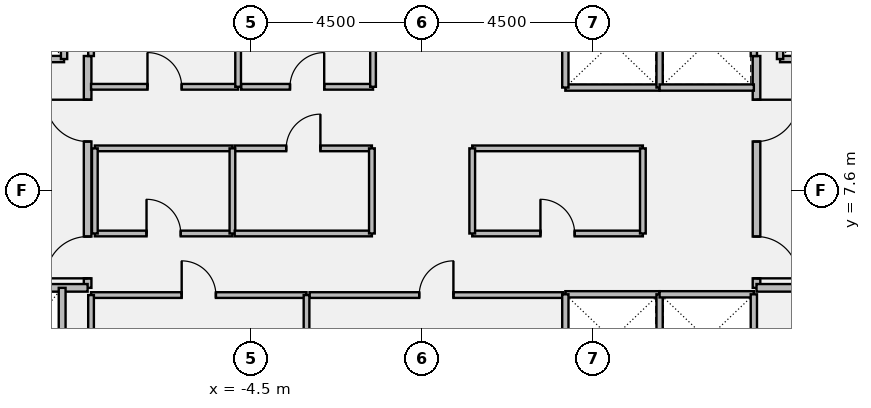
"""IFC4 building model, lengths in metres.
Left out: names, types, materials, properties, quantities, classifications, styles, units other than length and angle.
Written with IfcOpenShell. Run it as: python <this file> out.ifc"""

import sys

from ifc_helpers import new_model, si_unit, direction, frame, frame_2d, origin, place, context, subcontext, project, spatial, rectangle, extrude, element, fill, save


model = new_model("IFC4")
c1 = context("Model", 3, precision=1e-05, world=origin(), true_north=direction((0.0, 1.0)))
c2 = subcontext(c1, "Body", "Model", "MODEL_VIEW")
j1 = project(units=[si_unit("LENGTHUNIT", "METRE"), si_unit("PLANEANGLEUNIT", "RADIAN")], contexts=[c1])
p1 = place(None, origin())
s1 = spatial("IfcSite", under=j1, at=p1, CompositionType="ELEMENT")
p2 = place(p1, origin())
s2 = spatial("IfcBuilding", under=s1, at=p2, CompositionType="ELEMENT")
p3 = place(p2, frame((0.0, 0.0, 297.25)))
s3 = spatial("IfcBuildingStorey", under=s2, at=p3, CompositionType="ELEMENT", Elevation=297.25)
p4 = place(p3, frame((-8.8, 5.05, 0.0), z_axis=(0.0, 0.0, 1.0), x_axis=(0.0, 1.0, 0.0)))
e1 = element("IfcWall", 1, at=p4, inside=s3, PredefinedType="PARTITIONING", context=c2, shape_type="SweptSolid", body=[
    extrude(rectangle(XDim=6.1, YDim=0.2, at=frame_2d((3.05, 0.0))), origin(), (0.0, 0.0, 1.0), 3.56),
])
p5 = place(p4, frame((0.25, 0.0, 0.0)))
e2 = element("IfcOpeningElement", 2, at=p5, cuts=e1, PredefinedType="OPENING", context=c2, shape_type="SweptSolid", body=[
    extrude(rectangle(XDim=1.1, YDim=2.2, at=frame_2d((0.55, 1.1))), frame((0.0, 0.11, 0.0), z_axis=(0.0, -1.0, 0.0), x_axis=(1.0, 0.0, 0.0)), (0.0, 0.0, 1.0), 0.22),
])
p6 = place(p4, frame((3.85, 0.0, 0.0)))
e3 = element("IfcOpeningElement", 3, at=p6, cuts=e1, PredefinedType="OPENING", context=c2, shape_type="SweptSolid", body=[
    extrude(rectangle(XDim=1.1, YDim=2.2, at=frame_2d((0.55, 1.1))), frame((0.0, 0.11, 0.0), z_axis=(0.0, -1.0, 0.0), x_axis=(1.0, 0.0, 0.0)), (0.0, 0.0, 1.0), 0.22),
])
p7 = place(p3, frame((8.8, 11.15, 0.0), z_axis=(0.0, 0.0, 1.0), x_axis=(0.0, -1.0, 0.0)))
e4 = element("IfcWall", 4, at=p7, inside=s3, PredefinedType="PARTITIONING", context=c2, shape_type="SweptSolid", body=[
    extrude(rectangle(XDim=6.1, YDim=0.2, at=frame_2d((3.05, 0.0))), origin(), (0.0, 0.0, 1.0), 3.56),
])
p8 = place(p7, frame((1.15, 0.0, 0.0)))
e5 = element("IfcOpeningElement", 5, at=p8, cuts=e4, PredefinedType="OPENING", context=c2, shape_type="SweptSolid", body=[
    extrude(rectangle(XDim=1.1, YDim=2.2, at=frame_2d((0.55, 1.1))), frame((0.0, 0.11, 0.0), z_axis=(0.0, -1.0, 0.0), x_axis=(1.0, 0.0, 0.0)), (0.0, 0.0, 1.0), 0.22),
])
p9 = place(p7, frame((4.75, 0.0, 0.0)))
e6 = element("IfcOpeningElement", 6, at=p9, cuts=e4, PredefinedType="OPENING", context=c2, shape_type="SweptSolid", body=[
    extrude(rectangle(XDim=1.1, YDim=2.2, at=frame_2d((0.55, 1.1))), frame((0.0, 0.11, 0.0), z_axis=(0.0, -1.0, 0.0), x_axis=(1.0, 0.0, 0.0)), (0.0, 0.0, 1.0), 0.22),
])
p10 = place(p3, frame((-8.71, 4.86, 0.0), z_axis=(0.0, 0.0, 1.0), x_axis=(1.0, 0.0, 0.0)))
e7 = element("IfcWall", 7, at=p10, inside=s3, PredefinedType="PARTITIONING", context=c2, shape_type="SweptSolid", body=[
    extrude(rectangle(XDim=5.67, YDim=0.15, at=frame_2d((2.835, 0.0))), origin(), (0.0, 0.0, 1.0), 3.56),
])
p11 = place(p10, frame((2.385, 0.0, 0.0)))
e8 = element("IfcOpeningElement", 8, at=p11, cuts=e7, PredefinedType="OPENING", context=c2, shape_type="SweptSolid", body=[
    extrude(rectangle(XDim=0.9, YDim=2.15, at=frame_2d((0.45, 1.075))), frame((0.0, 0.085, 0.0), z_axis=(0.0, -1.0, 0.0), x_axis=(1.0, 0.0, 0.0)), (0.0, 0.0, 1.0), 0.17),
])
p12 = place(p3, frame((-2.96, 4.86, 0.0), z_axis=(0.0, 0.0, 1.0), x_axis=(1.0, 0.0, 0.0)))
e9 = element("IfcWall", 9, at=p12, inside=s3, PredefinedType="PARTITIONING", context=c2, shape_type="SweptSolid", body=[
    extrude(rectangle(XDim=6.67, YDim=0.15, at=frame_2d((3.335, 0.0))), origin(), (0.0, 0.0, 1.0), 3.56),
])
p13 = place(p12, frame((2.885, 0.0, 0.0)))
e10 = element("IfcOpeningElement", 10, at=p13, cuts=e9, PredefinedType="OPENING", context=c2, shape_type="SweptSolid", body=[
    extrude(rectangle(XDim=0.9, YDim=2.15, at=frame_2d((0.45, 1.075))), frame((0.0, 0.085, 0.0), z_axis=(0.0, -1.0, 0.0), x_axis=(1.0, 0.0, 0.0)), (0.0, 0.0, 1.0), 0.17),
])
p14 = place(p3, frame((-8.71, 10.34, 0.0), z_axis=(0.0, 0.0, 1.0), x_axis=(1.0, 0.0, 0.0)))
e11 = element("IfcWall", 11, at=p14, inside=s3, PredefinedType="PARTITIONING", context=c2, shape_type="SweptSolid", body=[
    extrude(rectangle(XDim=3.87, YDim=0.15, at=frame_2d((1.935, 0.0))), origin(), (0.0, 0.0, 1.0), 3.56),
])
p15 = place(p14, frame((1.485, 0.0, 0.0)))
e12 = element("IfcOpeningElement", 12, at=p15, cuts=e11, PredefinedType="OPENING", context=c2, shape_type="SweptSolid", body=[
    extrude(rectangle(XDim=0.9, YDim=2.15, at=frame_2d((0.45, 1.075))), frame((0.0, 0.085, 0.0), z_axis=(0.0, -1.0, 0.0), x_axis=(1.0, 0.0, 0.0)), (0.0, 0.0, 1.0), 0.17),
])
p16 = place(p3, frame((-4.76, 10.34, 0.0), z_axis=(0.0, 0.0, 1.0), x_axis=(1.0, 0.0, 0.0)))
e13 = element("IfcWall", 13, at=p16, inside=s3, PredefinedType="PARTITIONING", context=c2, shape_type="SweptSolid", body=[
    extrude(rectangle(XDim=3.47, YDim=0.15, at=frame_2d((1.735, 0.0))), origin(), (0.0, 0.0, 1.0), 3.56),
])
p17 = place(p16, frame((1.285, 0.0, 0.0)))
e14 = element("IfcOpeningElement", 14, at=p17, cuts=e13, PredefinedType="OPENING", context=c2, shape_type="SweptSolid", body=[
    extrude(rectangle(XDim=0.9, YDim=2.15, at=frame_2d((0.45, 1.075))), frame((0.0, 0.085, 0.0), z_axis=(0.0, -1.0, 0.0), x_axis=(1.0, 0.0, 0.0)), (0.0, 0.0, 1.0), 0.17),
])
p18 = place(p3, frame((-8.61, 6.48, 0.0), z_axis=(0.0, 0.0, 1.0), x_axis=(1.0, 0.0, 0.0)))
e15 = element("IfcWall", 15, at=p18, inside=s3, PredefinedType="PARTITIONING", context=c2, shape_type="SweptSolid", body=[
    extrude(rectangle(XDim=3.62, YDim=0.15, at=frame_2d((1.81, 0.0))), origin(), (0.0, 0.0, 1.0), 3.56),
])
p19 = place(p18, frame((1.36, 0.0, 0.0)))
e16 = element("IfcOpeningElement", 16, at=p19, cuts=e15, PredefinedType="OPENING", context=c2, shape_type="SweptSolid", body=[
    extrude(rectangle(XDim=0.9, YDim=2.15, at=frame_2d((0.45, 1.075))), frame((0.0, 0.085, 0.0), z_axis=(0.0, -1.0, 0.0), x_axis=(1.0, 0.0, 0.0)), (0.0, 0.0, 1.0), 0.17),
])
p20 = place(p3, frame((-4.93, 8.72, 0.0), z_axis=(0.0, 0.0, 1.0), x_axis=(1.0, 0.0, 0.0)))
e17 = element("IfcWall", 17, at=p20, inside=s3, PredefinedType="PARTITIONING", context=c2, shape_type="SweptSolid", body=[
    extrude(rectangle(XDim=3.61, YDim=0.15, at=frame_2d((1.805, 0.0))), origin(), (0.0, 0.0, 1.0), 3.56),
])
p21 = place(p20, frame((1.355, 0.0, 0.0)))
e18 = element("IfcOpeningElement", 18, at=p21, cuts=e17, PredefinedType="OPENING", context=c2, shape_type="SweptSolid", body=[
    extrude(rectangle(XDim=0.9, YDim=2.15, at=frame_2d((0.45, 1.075))), frame((0.0, 0.085, 0.0), z_axis=(0.0, -1.0, 0.0), x_axis=(1.0, 0.0, 0.0)), (0.0, 0.0, 1.0), 0.17),
])
p22 = place(p3, frame((1.32, 6.48, 0.0), z_axis=(0.0, 0.0, 1.0), x_axis=(1.0, 0.0, 0.0)))
e19 = element("IfcWall", 19, at=p22, inside=s3, PredefinedType="PARTITIONING", context=c2, shape_type="SweptSolid", body=[
    extrude(rectangle(XDim=4.49, YDim=0.15, at=frame_2d((2.245, 0.0))), origin(), (0.0, 0.0, 1.0), 3.56),
])
p23 = place(p22, frame((1.795, 0.0, 0.0)))
e20 = element("IfcOpeningElement", 20, at=p23, cuts=e19, PredefinedType="OPENING", context=c2, shape_type="SweptSolid", body=[
    extrude(rectangle(XDim=0.9, YDim=2.15, at=frame_2d((0.45, 1.075))), frame((0.0, 0.085, 0.0), z_axis=(0.0, -1.0, 0.0), x_axis=(1.0, 0.0, 0.0)), (0.0, 0.0, 1.0), 0.17),
])
for number, where, z_axis, x_axis in (
    (21, (-11.65, 5.05, 0.0), (0.0, 0.0, 1.0), (1.0, 0.0, 0.0)),
    (22, (8.8, 5.05, 0.0), (0.0, 0.0, 1.0), (1.0, 0.0, 0.0)),
):
    element("IfcWall", number, at=place(p3, frame(where, z_axis=z_axis, x_axis=x_axis)), inside=s3, PredefinedType="PARTITIONING", context=c2, shape_type="SweptSolid", body=[
        extrude(rectangle(XDim=2.85, YDim=0.2, at=frame_2d((1.425, 0.0))), origin(), (0.0, 0.0, 1.0), 3.56),
    ])
p24 = place(p3, frame((-11.58, 11.07, 0.0), z_axis=(0.0, 0.0, 1.0), x_axis=(1.0, 0.0, 0.0)))
e23 = element("IfcWall", 23, at=p24, inside=s3, PredefinedType="PARTITIONING", context=c2, shape_type="SweptSolid", body=[
    extrude(rectangle(XDim=2.16, YDim=0.165, at=frame_2d((1.08, 0.0))), origin(), (0.0, 0.0, 1.0), 3.56),
])
p25 = place(p3, frame((-9.42, 11.07, 0.0), z_axis=(0.0, 0.0, 1.0), x_axis=(0.0, 1.0, 0.0)))
e24 = element("IfcWall", 24, at=p25, inside=s3, PredefinedType="PARTITIONING", context=c2, shape_type="SweptSolid", body=[
    extrude(rectangle(XDim=2.96, YDim=0.165, at=frame_2d((1.48, 0.0))), origin(), (0.0, 0.0, 1.0), 3.56),
])
p26 = place(p3, frame((9.42, 11.07, 0.0), z_axis=(0.0, 0.0, 1.0), x_axis=(1.0, 0.0, 0.0)))
e25 = element("IfcWall", 25, at=p26, inside=s3, PredefinedType="PARTITIONING", context=c2, shape_type="SweptSolid", body=[
    extrude(rectangle(XDim=2.16, YDim=0.165, at=frame_2d((1.08, 0.0))), origin(), (0.0, 0.0, 1.0), 3.56),
])
p27 = place(p3, frame((9.42, 11.07, 0.0), z_axis=(0.0, 0.0, 1.0), x_axis=(0.0, 1.0, 0.0)))
e26 = element("IfcWall", 26, at=p27, inside=s3, PredefinedType="PARTITIONING", context=c2, shape_type="SweptSolid", body=[
    extrude(rectangle(XDim=2.96, YDim=0.165, at=frame_2d((1.48, 0.0))), origin(), (0.0, 0.0, 1.0), 3.56),
])
p28 = place(p3, frame((3.77, 4.88, 0.0), z_axis=(0.0, 0.0, 1.0), x_axis=(1.0, 0.0, 0.0)))
e27 = element("IfcWall", 27, at=p28, inside=s3, PredefinedType="PARTITIONING", context=c2, shape_type="SweptSolid", body=[
    extrude(rectangle(XDim=2.48, YDim=0.165, at=frame_2d((1.24, 0.0))), origin(), (0.0, 0.0, 1.0), 3.56),
])
for number, where, z_axis, x_axis in (
    (28, (3.77, 2.52, 0.0), (0.0, 0.0, 1.0), (0.0, 1.0, 0.0)),
    (29, (6.25, 2.52, 0.0), (0.0, 0.0, 1.0), (0.0, 1.0, 0.0)),
):
    element("IfcWall", number, at=place(p3, frame(where, z_axis=z_axis, x_axis=x_axis)), inside=s3, PredefinedType="PARTITIONING", context=c2, shape_type="SweptSolid", body=[
        extrude(rectangle(XDim=2.36, YDim=0.165, at=frame_2d((1.18, 0.0))), origin(), (0.0, 0.0, 1.0), 3.56),
    ])
p29 = place(p3, frame((6.25, 4.88, 0.0), z_axis=(0.0, 0.0, 1.0), x_axis=(1.0, 0.0, 0.0)))
e30 = element("IfcWall", 30, at=p29, inside=s3, PredefinedType="PARTITIONING", context=c2, shape_type="SweptSolid", body=[
    extrude(rectangle(XDim=2.48, YDim=0.165, at=frame_2d((1.24, 0.0))), origin(), (0.0, 0.0, 1.0), 3.56),
])
p30 = place(p3, frame((8.73, 2.52, 0.0), z_axis=(0.0, 0.0, 1.0), x_axis=(0.0, 1.0, 0.0)))
e31 = element("IfcWall", 31, at=p30, inside=s3, PredefinedType="PARTITIONING", context=c2, shape_type="SweptSolid", body=[
    extrude(rectangle(XDim=2.36, YDim=0.165, at=frame_2d((1.18, 0.0))), origin(), (0.0, 0.0, 1.0), 3.56),
])
p31 = place(p3, frame((3.77, 10.32, 0.0), z_axis=(0.0, 0.0, 1.0), x_axis=(1.0, 0.0, 0.0)))
e32 = element("IfcWall", 32, at=p31, inside=s3, PredefinedType="PARTITIONING", context=c2, shape_type="SweptSolid", body=[
    extrude(rectangle(XDim=2.48, YDim=0.165, at=frame_2d((1.24, 0.0))), origin(), (0.0, 0.0, 1.0), 3.56),
])
for number, where, z_axis, x_axis in (
    (33, (3.77, 10.32, 0.0), (0.0, 0.0, 1.0), (0.0, 1.0, 0.0)),
    (34, (6.25, 10.32, 0.0), (0.0, 0.0, 1.0), (0.0, 1.0, 0.0)),
):
    element("IfcWall", number, at=place(p3, frame(where, z_axis=z_axis, x_axis=x_axis)), inside=s3, PredefinedType="PARTITIONING", context=c2, shape_type="SweptSolid", body=[
        extrude(rectangle(XDim=2.36, YDim=0.165, at=frame_2d((1.18, 0.0))), origin(), (0.0, 0.0, 1.0), 3.56),
    ])
p32 = place(p3, frame((6.25, 10.32, 0.0), z_axis=(0.0, 0.0, 1.0), x_axis=(1.0, 0.0, 0.0)))
e35 = element("IfcWall", 35, at=p32, inside=s3, PredefinedType="PARTITIONING", context=c2, shape_type="SweptSolid", body=[
    extrude(rectangle(XDim=2.48, YDim=0.165, at=frame_2d((1.24, 0.0))), origin(), (0.0, 0.0, 1.0), 3.56),
])
p33 = place(p3, frame((8.73, 11.15, 0.0), z_axis=(0.0, 0.0, 1.0), x_axis=(0.0, 1.0, 0.0)))
e36 = element("IfcWall", 36, at=p33, inside=s3, PredefinedType="PARTITIONING", context=c2, shape_type="SweptSolid", body=[
    extrude(rectangle(XDim=1.53, YDim=0.165, at=frame_2d((0.765, 0.0))), origin(), (0.0, 0.0, 1.0), 3.56),
])
for number, where, z_axis, x_axis in (
    (37, (-8.71, 2.49, 0.0), (0.0, 0.0, 1.0), (0.0, 1.0, 0.0)),
    (38, (-3.04, 2.49, 0.0), (0.0, 0.0, 1.0), (0.0, 1.0, 0.0)),
):
    element("IfcWall", number, at=place(p3, frame(where, z_axis=z_axis, x_axis=x_axis)), inside=s3, PredefinedType="PARTITIONING", context=c2, shape_type="SweptSolid", body=[
        extrude(rectangle(XDim=2.37, YDim=0.15, at=frame_2d((1.185, 0.0))), origin(), (0.0, 0.0, 1.0), 3.56),
    ])
p34 = place(p3, frame((-8.71, 11.15, 0.0), z_axis=(0.0, 0.0, 1.0), x_axis=(0.0, 1.0, 0.0)))
e39 = element("IfcWall", 39, at=p34, inside=s3, PredefinedType="PARTITIONING", context=c2, shape_type="SweptSolid", body=[
    extrude(rectangle(XDim=1.71, YDim=0.15, at=frame_2d((0.855, 0.0))), origin(), (0.0, 0.0, 1.0), 3.56),
])
for number, where, z_axis, x_axis in (
    (40, (-4.84, 10.34, 0.0), (0.0, 0.0, 1.0), (0.0, 1.0, 0.0)),
    (41, (-1.29, 10.34, 0.0), (0.0, 0.0, 1.0), (0.0, 1.0, 0.0)),
):
    element("IfcWall", number, at=place(p3, frame(where, z_axis=z_axis, x_axis=x_axis)), inside=s3, PredefinedType="PARTITIONING", context=c2, shape_type="SweptSolid", body=[
        extrude(rectangle(XDim=2.52, YDim=0.15, at=frame_2d((1.26, 0.0))), origin(), (0.0, 0.0, 1.0), 3.56),
    ])
p35 = place(p3, frame((-9.47, 2.45, 0.0), z_axis=(0.0, 0.0, 1.0), x_axis=(0.0, 1.0, 0.0)))
e42 = element("IfcWall", 42, at=p35, inside=s3, PredefinedType="PARTITIONING", context=c2, shape_type="SweptSolid", body=[
    extrude(rectangle(XDim=2.6, YDim=0.18, at=frame_2d((1.3, 0.0))), origin(), (0.0, 0.0, 1.0), 3.56),
])
p36 = place(p3, frame((-8.61, 8.72, 0.0), z_axis=(0.0, 0.0, 1.0), x_axis=(1.0, 0.0, 0.0)))
e43 = element("IfcWall", 43, at=p36, inside=s3, PredefinedType="PARTITIONING", context=c2, shape_type="SweptSolid", body=[
    extrude(rectangle(XDim=3.62, YDim=0.15, at=frame_2d((1.81, 0.0))), origin(), (0.0, 0.0, 1.0), 3.56),
])
for number, where, z_axis, x_axis in (
    (44, (-8.61, 6.48, 0.0), (0.0, 0.0, 1.0), (0.0, 1.0, 0.0)),
    (45, (-4.99, 6.48, 0.0), (0.0, 0.0, 1.0), (0.0, 1.0, 0.0)),
):
    element("IfcWall", number, at=place(p3, frame(where, z_axis=z_axis, x_axis=x_axis)), inside=s3, PredefinedType="PARTITIONING", context=c2, shape_type="SweptSolid", body=[
        extrude(rectangle(XDim=2.24, YDim=0.15, at=frame_2d((1.12, 0.0))), origin(), (0.0, 0.0, 1.0), 3.56),
    ])
p37 = place(p3, frame((-4.93, 6.48, 0.0), z_axis=(0.0, 0.0, 1.0), x_axis=(1.0, 0.0, 0.0)))
e46 = element("IfcWall", 46, at=p37, inside=s3, PredefinedType="PARTITIONING", context=c2, shape_type="SweptSolid", body=[
    extrude(rectangle(XDim=3.61, YDim=0.15, at=frame_2d((1.805, 0.0))), origin(), (0.0, 0.0, 1.0), 3.56),
])
p38 = place(p3, frame((-1.32, 6.48, 0.0), z_axis=(0.0, 0.0, 1.0), x_axis=(0.0, 1.0, 0.0)))
e47 = element("IfcWall", 47, at=p38, inside=s3, PredefinedType="PARTITIONING", context=c2, shape_type="SweptSolid", body=[
    extrude(rectangle(XDim=2.24, YDim=0.15, at=frame_2d((1.12, 0.0))), origin(), (0.0, 0.0, 1.0), 3.56),
])
p39 = place(p3, frame((1.32, 8.72, 0.0), z_axis=(0.0, 0.0, 1.0), x_axis=(1.0, 0.0, 0.0)))
e48 = element("IfcWall", 48, at=p39, inside=s3, PredefinedType="PARTITIONING", context=c2, shape_type="SweptSolid", body=[
    extrude(rectangle(XDim=4.49, YDim=0.15, at=frame_2d((2.245, 0.0))), origin(), (0.0, 0.0, 1.0), 3.56),
])
for number, where, z_axis, x_axis in (
    (49, (1.32, 6.48, 0.0), (0.0, 0.0, 1.0), (0.0, 1.0, 0.0)),
    (50, (5.81, 6.48, 0.0), (0.0, 0.0, 1.0), (0.0, 1.0, 0.0)),
):
    element("IfcWall", number, at=place(p3, frame(where, z_axis=z_axis, x_axis=x_axis)), inside=s3, PredefinedType="PARTITIONING", context=c2, shape_type="SweptSolid", body=[
        extrude(rectangle(XDim=2.24, YDim=0.15, at=frame_2d((1.12, 0.0))), origin(), (0.0, 0.0, 1.0), 3.56),
    ])
p40 = place(p5, origin())
e51 = element("IfcDoor", 51, at=p40, inside=s3, OperationType="SINGLE_SWING_LEFT", PredefinedType="DOOR", context=c2, shape_type="SweptSolid", body=[
    extrude(rectangle(XDim=1.1, YDim=2.2, at=frame_2d((0.55, 1.1))), frame((0.0, 0.025, 0.0), z_axis=(0.0, -1.0, 0.0), x_axis=(1.0, 0.0, 0.0)), (0.0, 0.0, 1.0), 0.05),
])
fill(e2, e51)
p41 = place(p6, origin())
e52 = element("IfcDoor", 52, at=p41, inside=s3, OperationType="SINGLE_SWING_RIGHT", PredefinedType="DOOR", context=c2, shape_type="SweptSolid", body=[
    extrude(rectangle(XDim=1.1, YDim=2.2, at=frame_2d((0.55, 1.1))), frame((0.0, 0.025, 0.0), z_axis=(0.0, -1.0, 0.0), x_axis=(1.0, 0.0, 0.0)), (0.0, 0.0, 1.0), 0.05),
])
fill(e3, e52)
p42 = place(p8, origin())
e53 = element("IfcDoor", 53, at=p42, inside=s3, OperationType="SINGLE_SWING_LEFT", PredefinedType="DOOR", context=c2, shape_type="SweptSolid", body=[
    extrude(rectangle(XDim=1.1, YDim=2.2, at=frame_2d((0.55, 1.1))), frame((0.0, 0.025, 0.0), z_axis=(0.0, -1.0, 0.0), x_axis=(1.0, 0.0, 0.0)), (0.0, 0.0, 1.0), 0.05),
])
fill(e5, e53)
p43 = place(p9, origin())
e54 = element("IfcDoor", 54, at=p43, inside=s3, OperationType="SINGLE_SWING_RIGHT", PredefinedType="DOOR", context=c2, shape_type="SweptSolid", body=[
    extrude(rectangle(XDim=1.1, YDim=2.2, at=frame_2d((0.55, 1.1))), frame((0.0, 0.025, 0.0), z_axis=(0.0, -1.0, 0.0), x_axis=(1.0, 0.0, 0.0)), (0.0, 0.0, 1.0), 0.05),
])
fill(e6, e54)
p44 = place(p11, origin())
e55 = element("IfcDoor", 55, at=p44, inside=s3, OperationType="SINGLE_SWING_LEFT", PredefinedType="DOOR", context=c2, shape_type="SweptSolid", body=[
    extrude(rectangle(XDim=0.9, YDim=2.15, at=frame_2d((0.45, 1.075))), frame((0.0, 0.025, 0.0), z_axis=(0.0, -1.0, 0.0), x_axis=(1.0, 0.0, 0.0)), (0.0, 0.0, 1.0), 0.05),
])
fill(e8, e55)
p45 = place(p13, origin())
e56 = element("IfcDoor", 56, at=p45, inside=s3, OperationType="SINGLE_SWING_RIGHT", PredefinedType="DOOR", context=c2, shape_type="SweptSolid", body=[
    extrude(rectangle(XDim=0.9, YDim=2.15, at=frame_2d((0.45, 1.075))), frame((0.0, 0.025, 0.0), z_axis=(0.0, -1.0, 0.0), x_axis=(1.0, 0.0, 0.0)), (0.0, 0.0, 1.0), 0.05),
])
fill(e10, e56)
p46 = place(p15, origin())
e57 = element("IfcDoor", 57, at=p46, inside=s3, OperationType="SINGLE_SWING_LEFT", PredefinedType="DOOR", context=c2, shape_type="SweptSolid", body=[
    extrude(rectangle(XDim=0.9, YDim=2.15, at=frame_2d((0.45, 1.075))), frame((0.0, 0.025, 0.0), z_axis=(0.0, -1.0, 0.0), x_axis=(1.0, 0.0, 0.0)), (0.0, 0.0, 1.0), 0.05),
])
fill(e12, e57)
p47 = place(p17, origin())
e58 = element("IfcDoor", 58, at=p47, inside=s3, OperationType="SINGLE_SWING_RIGHT", PredefinedType="DOOR", context=c2, shape_type="SweptSolid", body=[
    extrude(rectangle(XDim=0.9, YDim=2.15, at=frame_2d((0.45, 1.075))), frame((0.0, 0.025, 0.0), z_axis=(0.0, -1.0, 0.0), x_axis=(1.0, 0.0, 0.0)), (0.0, 0.0, 1.0), 0.05),
])
fill(e14, e58)
p48 = place(p19, origin())
e59 = element("IfcDoor", 59, at=p48, inside=s3, OperationType="SINGLE_SWING_LEFT", PredefinedType="DOOR", context=c2, shape_type="SweptSolid", body=[
    extrude(rectangle(XDim=0.9, YDim=2.15, at=frame_2d((0.45, 1.075))), frame((0.0, 0.025, 0.0), z_axis=(0.0, -1.0, 0.0), x_axis=(1.0, 0.0, 0.0)), (0.0, 0.0, 1.0), 0.05),
])
fill(e16, e59)
p49 = place(p21, origin())
e60 = element("IfcDoor", 60, at=p49, inside=s3, OperationType="SINGLE_SWING_RIGHT", PredefinedType="DOOR", context=c2, shape_type="SweptSolid", body=[
    extrude(rectangle(XDim=0.9, YDim=2.15, at=frame_2d((0.45, 1.075))), frame((0.0, 0.025, 0.0), z_axis=(0.0, -1.0, 0.0), x_axis=(1.0, 0.0, 0.0)), (0.0, 0.0, 1.0), 0.05),
])
fill(e18, e60)
p50 = place(p23, origin())
e61 = element("IfcDoor", 61, at=p50, inside=s3, OperationType="SINGLE_SWING_LEFT", PredefinedType="DOOR", context=c2, shape_type="SweptSolid", body=[
    extrude(rectangle(XDim=0.9, YDim=2.15, at=frame_2d((0.45, 1.075))), frame((0.0, 0.025, 0.0), z_axis=(0.0, -1.0, 0.0), x_axis=(1.0, 0.0, 0.0)), (0.0, 0.0, 1.0), 0.05),
])
fill(e20, e61)
save(model, sys.argv[1])
